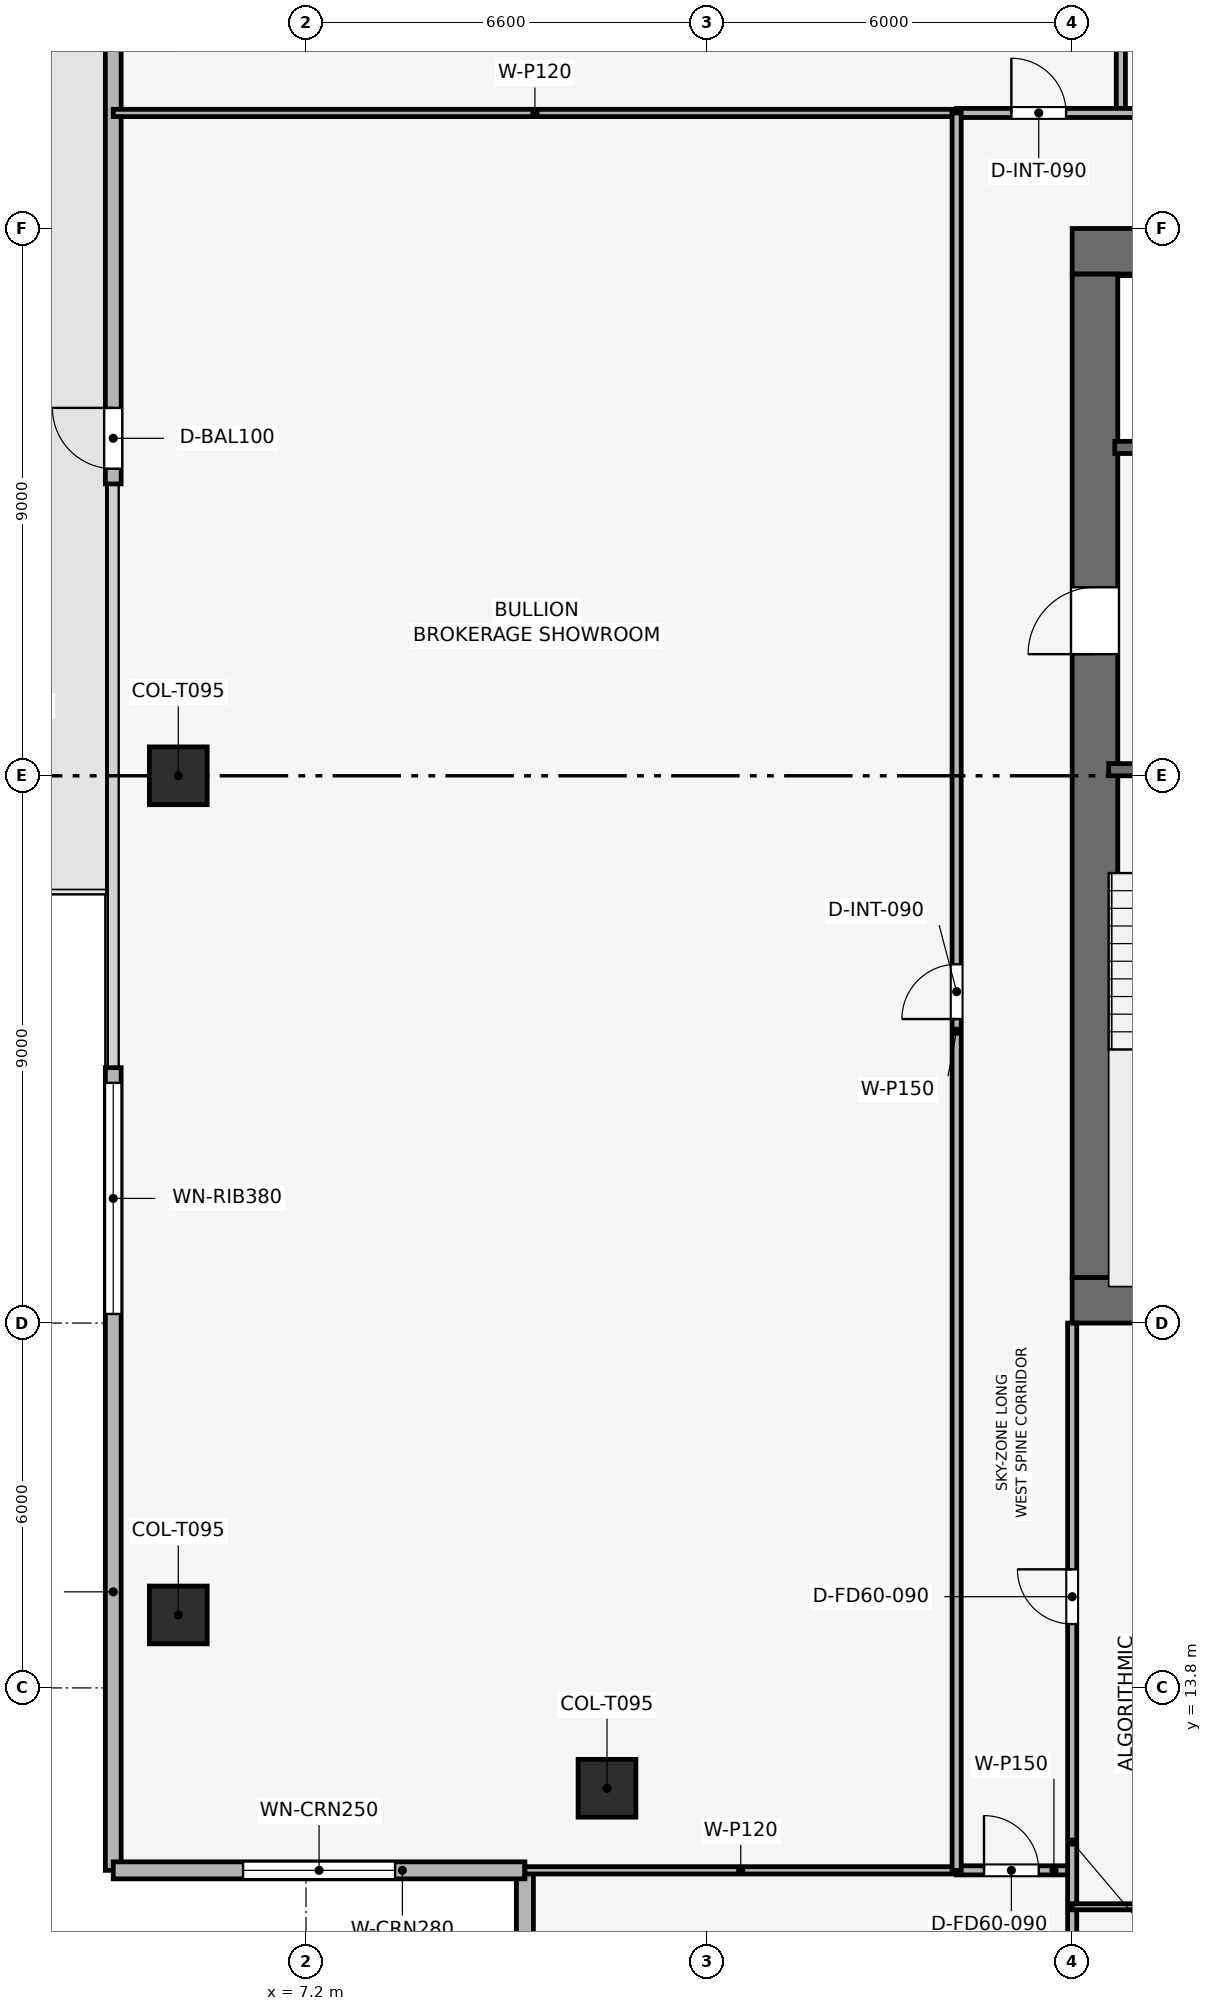
"""IFC4 building model, lengths in metres.
Left out: names, types, materials, properties, quantities, classifications, styles, units other than length and angle.
Written with IfcOpenShell. Run it as: python <this file> out.ifc"""

import sys

from ifc_helpers import new_model, si_unit, direction, frame, frame_2d, origin, origin_2d, place, context, subcontext, project, spatial, rectangle, extrude, element, fill, save


model = new_model("IFC4")
c1 = context("Model", 3, precision=1e-05, world=origin(), true_north=direction((0.0, 1.0)))
c2 = subcontext(c1, "Body", "Model", "MODEL_VIEW")
j1 = project(units=[si_unit("LENGTHUNIT", "METRE"), si_unit("PLANEANGLEUNIT", "RADIAN")], contexts=[c1])
p1 = place(None, origin())
s1 = spatial("IfcSite", under=j1, at=p1, CompositionType="ELEMENT")
p2 = place(p1, origin())
s2 = spatial("IfcBuilding", under=s1, at=p2, CompositionType="ELEMENT")
p3 = place(p2, frame((0.0, 0.0, 265.35)))
s3 = spatial("IfcBuildingStorey", under=s2, at=p3, CompositionType="ELEMENT", Elevation=265.35)
p4 = place(p3, frame((19.8, 20.175, 0.0), z_axis=(0.0, 0.0, 1.0), x_axis=(1.0, 0.0, 0.0)))
e1 = element("IfcWall", 1, at=p4, inside=s3, PredefinedType="SHEAR", context=c2, shape_type="SweptSolid", body=[
    extrude(rectangle(XDim=18.0, YDim=0.75, at=frame_2d((9.0, 0.0))), origin(), (0.0, 0.0, 1.0), 3.75),
])
p5 = place(p3, frame((19.8, 37.425, 0.0), z_axis=(0.0, 0.0, 1.0), x_axis=(1.0, 0.0, 0.0)))
e2 = element("IfcWall", 2, at=p5, inside=s3, PredefinedType="SHEAR", context=c2, shape_type="SweptSolid", body=[
    extrude(rectangle(XDim=18.0, YDim=0.75, at=frame_2d((9.0, 0.0))), origin(), (0.0, 0.0, 1.0), 3.75),
])
p6 = place(p5, frame((7.05, 0.0, 0.0)))
e3 = element("IfcOpeningElement", 3, at=p6, cuts=e2, PredefinedType="OPENING", context=c2, shape_type="SweptSolid", body=[
    extrude(rectangle(XDim=1.1, YDim=2.15, at=frame_2d((0.55, 1.075))), frame((0.0, 0.385, 0.0), z_axis=(0.0, -1.0, 0.0), x_axis=(1.0, 0.0, 0.0)), (0.0, 0.0, 1.0), 0.77),
])
p7 = place(p3, frame((20.175, 20.55, 0.0), z_axis=(0.0, 0.0, 1.0), x_axis=(0.0, 1.0, 0.0)))
e4 = element("IfcWall", 4, at=p7, inside=s3, PredefinedType="SHEAR", context=c2, shape_type="SweptSolid", body=[
    extrude(rectangle(XDim=16.5, YDim=0.75, at=frame_2d((8.25, 0.0))), origin(), (0.0, 0.0, 1.0), 3.75),
])
p8 = place(p7, frame((10.25, 0.0, 0.0)))
e5 = element("IfcOpeningElement", 5, at=p8, cuts=e4, PredefinedType="OPENING", context=c2, shape_type="SweptSolid", body=[
    extrude(rectangle(XDim=1.1, YDim=2.15, at=frame_2d((0.55, 1.075))), frame((0.0, 0.385, 0.0), z_axis=(0.0, -1.0, 0.0), x_axis=(1.0, 0.0, 0.0)), (0.0, 0.0, 1.0), 0.77),
])
for number, where, z_axis, x_axis in (
    (6, (5.1, 28.8, 0.003), (0.0, 0.0, 1.0), (1.0, 0.0, 0.0)),
    (7, (5.1, 15.0, 0.003), (0.0, 0.0, 1.0), (1.0, 0.0, 0.0)),
    (8, (12.15, 12.15, 0.003), (0.0, 0.0, 1.0), (1.0, 0.0, 0.0)),
):
    element("IfcColumn", number, at=place(p3, frame(where, z_axis=z_axis, x_axis=x_axis)), inside=s3, PredefinedType="COLUMN", context=c2, shape_type="SweptSolid", body=[
        extrude(rectangle(XDim=0.95, YDim=0.95, at=origin_2d()), origin(), (0.0, 0.0, 1.0), 3.494),
    ])
p9 = place(p3, frame((4.03, 10.8, 0.0), z_axis=(0.0, 0.0, 1.0), x_axis=(0.0, 1.0, 0.0)))
e9 = element("IfcWall", 9, at=p9, inside=s3, PredefinedType="SOLIDWALL", context=c2, shape_type="SweptSolid", body=[
    extrude(rectangle(XDim=13.2, YDim=0.26, at=frame_2d((6.6, 0.0))), origin(), (0.0, 0.0, 1.0), 3.5),
])
p10 = place(p9, frame((9.15, 0.0, 0.9)))
e10 = element("IfcOpeningElement", 10, at=p10, cuts=e9, PredefinedType="OPENING", context=c2, shape_type="SweptSolid", body=[
    extrude(rectangle(XDim=3.8, YDim=1.9, at=frame_2d((1.9, 0.95))), frame((0.0, 0.14, 0.0), z_axis=(0.0, -1.0, 0.0), x_axis=(1.0, 0.0, 0.0)), (0.0, 0.0, 1.0), 0.28),
])
p11 = place(p3, frame((4.03, 33.6, 0.0), z_axis=(0.0, 0.0, 1.0), x_axis=(0.0, 1.0, 0.0)))
e11 = element("IfcWall", 11, at=p11, inside=s3, PredefinedType="SOLIDWALL", context=c2, shape_type="SweptSolid", body=[
    extrude(rectangle(XDim=13.2, YDim=0.26, at=frame_2d((6.6, 0.0))), origin(), (0.0, 0.0, 1.0), 3.5),
])
p12 = place(p11, frame((0.25, 0.0, 0.0)))
e12 = element("IfcOpeningElement", 12, at=p12, cuts=e11, PredefinedType="OPENING", context=c2, shape_type="SweptSolid", body=[
    extrude(rectangle(XDim=1.0, YDim=2.2, at=frame_2d((0.5, 1.1))), frame((0.0, 0.14, 0.0), z_axis=(0.0, -1.0, 0.0), x_axis=(1.0, 0.0, 0.0)), (0.0, 0.0, 1.0), 0.28),
])
p13 = place(p3, frame((10.8, 4.03, 0.0), z_axis=(0.0, 0.0, 1.0), x_axis=(0.0, 1.0, 0.0)))
e13 = element("IfcWall", 13, at=p13, inside=s3, PredefinedType="SOLIDWALL", context=c2, shape_type="SweptSolid", body=[
    extrude(rectangle(XDim=6.77, YDim=0.28, at=frame_2d((3.385, 0.0))), origin(), (0.0, 0.0, 1.0), 3.5),
])
p14 = place(p13, frame((2.135, 0.0, 0.9)))
e14 = element("IfcOpeningElement", 14, at=p14, cuts=e13, PredefinedType="OPENING", context=c2, shape_type="SweptSolid", body=[
    extrude(rectangle(XDim=2.5, YDim=1.9, at=frame_2d((1.25, 0.95))), frame((0.0, 0.15, 0.0), z_axis=(0.0, -1.0, 0.0), x_axis=(1.0, 0.0, 0.0)), (0.0, 0.0, 1.0), 0.3),
])
p15 = place(p3, frame((10.8, 10.8, 0.0), z_axis=(0.0, 0.0, 1.0), x_axis=(-1.0, 0.0, 0.0)))
e15 = element("IfcWall", 15, at=p15, inside=s3, PredefinedType="SOLIDWALL", context=c2, shape_type="SweptSolid", body=[
    extrude(rectangle(XDim=6.77, YDim=0.28, at=frame_2d((3.385, 0.0))), origin(), (0.0, 0.0, 1.0), 3.5),
])
p16 = place(p15, frame((2.135, 0.0, 0.9)))
e16 = element("IfcOpeningElement", 16, at=p16, cuts=e15, PredefinedType="OPENING", context=c2, shape_type="SweptSolid", body=[
    extrude(rectangle(XDim=2.5, YDim=1.9, at=frame_2d((1.25, 0.95))), frame((0.0, 0.15, 0.0), z_axis=(0.0, -1.0, 0.0), x_axis=(1.0, 0.0, 0.0)), (0.0, 0.0, 1.0), 0.3),
])
p17 = place(p3, frame((20.4, 28.9, 0.0), z_axis=(0.0, 0.0, 1.0), x_axis=(1.0, 0.0, 0.0)))
e17 = element("IfcWall", 17, at=p17, inside=s3, PredefinedType="SHEAR", context=c2, shape_type="SweptSolid", body=[
    extrude(rectangle(XDim=3.15, YDim=0.2, at=frame_2d((1.575, 0.0))), origin(), (0.0, 0.0, 1.0), 3.5),
])
p18 = place(p17, frame((0.8, 0.0, 0.0)))
e18 = element("IfcOpeningElement", 18, at=p18, cuts=e17, PredefinedType="OPENING", context=c2, shape_type="SweptSolid", body=[
    extrude(rectangle(XDim=1.0, YDim=2.1, at=frame_2d((0.5, 1.05))), frame((0.0, 0.11, 0.0), z_axis=(0.0, -1.0, 0.0), x_axis=(1.0, 0.0, 0.0)), (0.0, 0.0, 1.0), 0.22),
])
p19 = place(p3, frame((20.5, 34.2, 0.0), z_axis=(0.0, 0.0, 1.0), x_axis=(1.0, 0.0, 0.0)))
e19 = element("IfcWall", 19, at=p19, inside=s3, PredefinedType="SHEAR", context=c2, shape_type="SweptSolid", body=[
    extrude(rectangle(XDim=3.05, YDim=0.2, at=frame_2d((1.525, 0.0))), origin(), (0.0, 0.0, 1.0), 3.5),
])
p20 = place(p19, frame((0.75, 0.0, 0.0)))
e20 = element("IfcOpeningElement", 20, at=p20, cuts=e19, PredefinedType="OPENING", context=c2, shape_type="SweptSolid", body=[
    extrude(rectangle(XDim=1.1, YDim=2.15, at=frame_2d((0.55, 1.075))), frame((0.0, 0.11, 0.0), z_axis=(0.0, -1.0, 0.0), x_axis=(1.0, 0.0, 0.0)), (0.0, 0.0, 1.0), 0.22),
])
p21 = place(p3, frame((20.6, 39.7, 0.0), z_axis=(0.0, 0.0, 1.0), x_axis=(0.0, 1.0, 0.0)))
e21 = element("IfcWall", 21, at=p21, inside=s3, PredefinedType="PARTITIONING", context=c2, shape_type="SweptSolid", body=[
    extrude(rectangle(XDim=13.87, YDim=0.15, at=frame_2d((6.935, 0.0))), origin(), (0.0, 0.0, 1.0), 3.085),
])
p22 = place(p21, frame((8.035, 0.0, 0.0)))
e22 = element("IfcOpeningElement", 22, at=p22, cuts=e21, PredefinedType="OPENING", context=c2, shape_type="SweptSolid", body=[
    extrude(rectangle(XDim=0.9, YDim=2.1, at=frame_2d((0.45, 1.05))), frame((0.0, 0.085, 0.0), z_axis=(0.0, -1.0, 0.0), x_axis=(1.0, 0.0, 0.0)), (0.0, 0.0, 1.0), 0.17),
])
p23 = place(p3, frame((10.8, 10.8, 0.0), z_axis=(0.0, 0.0, 1.0), x_axis=(1.0, 0.0, 0.0)))
e23 = element("IfcWall", 23, at=p23, inside=s3, PredefinedType="PARTITIONING", context=c2, shape_type="SweptSolid", body=[
    extrude(rectangle(XDim=7.1, YDim=0.12, at=frame_2d((3.55, 0.0))), origin(), (0.0, 0.0, 1.0), 3.085),
])
p24 = place(p3, frame((17.9, 10.8, 0.0), z_axis=(0.0, 0.0, 1.0), x_axis=(1.0, 0.0, 0.0)))
e24 = element("IfcWall", 24, at=p24, inside=s3, PredefinedType="PARTITIONING", context=c2, shape_type="SweptSolid", body=[
    extrude(rectangle(XDim=1.9, YDim=0.15, at=frame_2d((0.95, 0.0))), origin(), (0.0, 0.0, 1.0), 3.5),
])
p25 = place(p24, frame((0.45, 0.0, 0.0)))
e25 = element("IfcOpeningElement", 25, at=p25, cuts=e24, PredefinedType="OPENING", context=c2, shape_type="SweptSolid", body=[
    extrude(rectangle(XDim=0.9, YDim=2.1, at=frame_2d((0.45, 1.05))), frame((0.0, 0.085, 0.0), z_axis=(0.0, -1.0, 0.0), x_axis=(1.0, 0.0, 0.0)), (0.0, 0.0, 1.0), 0.17),
])
p26 = place(p3, frame((19.8, 4.03, 0.0), z_axis=(0.0, 0.0, 1.0), x_axis=(0.0, 1.0, 0.0)))
e26 = element("IfcWall", 26, at=p26, inside=s3, PredefinedType="PARTITIONING", context=c2, shape_type="SweptSolid", body=[
    extrude(rectangle(XDim=15.77, YDim=0.15, at=frame_2d((7.885, 0.0))), origin(), (0.0, 0.0, 1.0), 3.085),
])
p27 = place(p26, frame((10.82, 0.0, 0.0)))
e27 = element("IfcOpeningElement", 27, at=p27, cuts=e26, PredefinedType="OPENING", context=c2, shape_type="SweptSolid", body=[
    extrude(rectangle(XDim=0.9, YDim=2.1, at=frame_2d((0.45, 1.05))), frame((0.0, 0.085, 0.0), z_axis=(0.0, -1.0, 0.0), x_axis=(1.0, 0.0, 0.0)), (0.0, 0.0, 1.0), 0.17),
])
p28 = place(p3, frame((19.8, 10.201, 0.0), z_axis=(0.0, 0.0, 1.0), x_axis=(1.0, 0.0, 0.0)))
e28 = element("IfcWall", 28, at=p28, inside=s3, PredefinedType="MOVABLE", context=c2, shape_type="SweptSolid", body=[
    extrude(rectangle(XDim=2.3, YDim=0.1, at=frame_2d((1.15, 0.0))), origin(), (0.0, 0.0, 1.0), 3.085),
])
p29 = place(p28, frame((1.2, 0.0, 0.0)))
e29 = element("IfcOpeningElement", 29, at=p29, cuts=e28, PredefinedType="OPENING", context=c2, shape_type="SweptSolid", body=[
    extrude(rectangle(XDim=0.9, YDim=2.1, at=frame_2d((0.45, 1.05))), frame((0.0, 0.06, 0.0), z_axis=(0.0, -1.0, 0.0), x_axis=(1.0, 0.0, 0.0)), (0.0, 0.0, 1.0), 0.12),
])
p30 = place(p3, frame((4.03, 39.7, 0.0), z_axis=(0.0, 0.0, 1.0), x_axis=(1.0, 0.0, 0.0)))
e30 = element("IfcWall", 30, at=p30, inside=s3, PredefinedType="PARTITIONING", context=c2, shape_type="SweptSolid", body=[
    extrude(rectangle(XDim=13.87, YDim=0.12, at=frame_2d((6.935, 0.0))), origin(), (0.0, 0.0, 1.0), 3.085),
])
p31 = place(p3, frame((17.9, 39.7, 0.0), z_axis=(0.0, 0.0, 1.0), x_axis=(1.0, 0.0, 0.0)))
e31 = element("IfcWall", 31, at=p31, inside=s3, PredefinedType="PARTITIONING", context=c2, shape_type="SweptSolid", body=[
    extrude(rectangle(XDim=21.8, YDim=0.15, at=frame_2d((10.9, 0.0))), origin(), (0.0, 0.0, 1.0), 3.085),
])
p32 = place(p31, frame((0.9, 0.0, 0.0)))
e32 = element("IfcOpeningElement", 32, at=p32, cuts=e31, PredefinedType="OPENING", context=c2, shape_type="SweptSolid", body=[
    extrude(rectangle(XDim=0.9, YDim=2.1, at=frame_2d((0.45, 1.05))), frame((0.0, 0.085, 0.0), z_axis=(0.0, -1.0, 0.0), x_axis=(1.0, 0.0, 0.0)), (0.0, 0.0, 1.0), 0.17),
])
p33 = place(p31, frame((3.65, 0.0, 0.0)))
e33 = element("IfcOpeningElement", 33, at=p33, cuts=e31, PredefinedType="OPENING", context=c2, shape_type="SweptSolid", body=[
    extrude(rectangle(XDim=0.9, YDim=2.1, at=frame_2d((0.45, 1.05))), frame((0.0, 0.085, 0.0), z_axis=(0.0, -1.0, 0.0), x_axis=(1.0, 0.0, 0.0)), (0.0, 0.0, 1.0), 0.17),
])
p34 = place(p31, frame((6.55, 0.0, 0.0)))
e34 = element("IfcOpeningElement", 34, at=p34, cuts=e31, PredefinedType="OPENING", context=c2, shape_type="SweptSolid", body=[
    extrude(rectangle(XDim=0.9, YDim=2.1, at=frame_2d((0.45, 1.05))), frame((0.0, 0.085, 0.0), z_axis=(0.0, -1.0, 0.0), x_axis=(1.0, 0.0, 0.0)), (0.0, 0.0, 1.0), 0.17),
])
p35 = place(p31, frame((9.3, 0.0, 0.0)))
e35 = element("IfcOpeningElement", 35, at=p35, cuts=e31, PredefinedType="OPENING", context=c2, shape_type="SweptSolid", body=[
    extrude(rectangle(XDim=0.95, YDim=2.1, at=frame_2d((0.475, 1.05))), frame((0.0, 0.085, 0.0), z_axis=(0.0, -1.0, 0.0), x_axis=(1.0, 0.0, 0.0)), (0.0, 0.0, 1.0), 0.17),
])
p36 = place(p31, frame((16.0, 0.0, 0.0)))
e36 = element("IfcOpeningElement", 36, at=p36, cuts=e31, PredefinedType="OPENING", context=c2, shape_type="SweptSolid", body=[
    extrude(rectangle(XDim=0.9, YDim=2.1, at=frame_2d((0.45, 1.05))), frame((0.0, 0.085, 0.0), z_axis=(0.0, -1.0, 0.0), x_axis=(1.0, 0.0, 0.0)), (0.0, 0.0, 1.0), 0.17),
])
p37 = place(p3, frame((17.9, 10.8, 0.0), z_axis=(0.0, 0.0, 1.0), x_axis=(0.0, 1.0, 0.0)))
e37 = element("IfcWall", 37, at=p37, inside=s3, PredefinedType="PARTITIONING", context=c2, shape_type="SweptSolid", body=[
    extrude(rectangle(XDim=28.9, YDim=0.15, at=frame_2d((14.45, 0.0))), origin(), (0.0, 0.0, 1.0), 3.085),
])
p38 = place(p37, frame((14.0, 0.0, 0.0)))
e38 = element("IfcOpeningElement", 38, at=p38, cuts=e37, PredefinedType="OPENING", context=c2, shape_type="SweptSolid", body=[
    extrude(rectangle(XDim=0.9, YDim=2.1, at=frame_2d((0.45, 1.05))), frame((0.0, 0.085, 0.0), z_axis=(0.0, -1.0, 0.0), x_axis=(1.0, 0.0, 0.0)), (0.0, 0.0, 1.0), 0.17),
])
p39 = place(p12, origin())
e39 = element("IfcDoor", 39, at=p39, inside=s3, OperationType="SINGLE_SWING_RIGHT", PredefinedType="DOOR", context=c2, shape_type="SweptSolid", body=[
    extrude(rectangle(XDim=1.0, YDim=2.2, at=frame_2d((0.5, 1.1))), frame((0.0, 0.025, 0.0), z_axis=(0.0, -1.0, 0.0), x_axis=(1.0, 0.0, 0.0)), (0.0, 0.0, 1.0), 0.05),
])
fill(e12, e39)
p40 = place(p10, origin())
e40 = element("IfcWindow", 40, at=p40, inside=s3, PartitioningType="SINGLE_PANEL", PredefinedType="WINDOW", context=c2, shape_type="SweptSolid", body=[
    extrude(rectangle(XDim=3.8, YDim=1.9, at=frame_2d((1.9, 0.95))), frame((0.0, 0.03, 0.0), z_axis=(0.0, -1.0, 0.0), x_axis=(1.0, 0.0, 0.0)), (0.0, 0.0, 1.0), 0.06),
])
fill(e10, e40)
p41 = place(p16, origin())
e41 = element("IfcWindow", 41, at=p41, inside=s3, PartitioningType="SINGLE_PANEL", PredefinedType="WINDOW", context=c2, shape_type="SweptSolid", body=[
    extrude(rectangle(XDim=2.5, YDim=1.9, at=frame_2d((1.25, 0.95))), frame((0.0, 0.03, 0.0), z_axis=(0.0, -1.0, 0.0), x_axis=(1.0, 0.0, 0.0)), (0.0, 0.0, 1.0), 0.06),
])
fill(e16, e41)
p42 = place(p25, origin())
e42 = element("IfcDoor", 42, at=p42, inside=s3, OperationType="SINGLE_SWING_LEFT", PredefinedType="DOOR", context=c2, shape_type="SweptSolid", body=[
    extrude(rectangle(XDim=0.9, YDim=2.1, at=frame_2d((0.45, 1.05))), frame((0.0, 0.025, 0.0), z_axis=(0.0, -1.0, 0.0), x_axis=(1.0, 0.0, 0.0)), (0.0, 0.0, 1.0), 0.05),
])
fill(e25, e42)
p43 = place(p27, origin())
e43 = element("IfcDoor", 43, at=p43, inside=s3, OperationType="SINGLE_SWING_RIGHT", PredefinedType="DOOR", context=c2, shape_type="SweptSolid", body=[
    extrude(rectangle(XDim=0.9, YDim=2.1, at=frame_2d((0.45, 1.05))), frame((0.0, 0.025, 0.0), z_axis=(0.0, -1.0, 0.0), x_axis=(1.0, 0.0, 0.0)), (0.0, 0.0, 1.0), 0.05),
])
fill(e27, e43)
p44 = place(p32, origin())
e44 = element("IfcDoor", 44, at=p44, inside=s3, OperationType="SINGLE_SWING_LEFT", PredefinedType="DOOR", context=c2, shape_type="SweptSolid", body=[
    extrude(rectangle(XDim=0.9, YDim=2.1, at=frame_2d((0.45, 1.05))), frame((0.0, 0.025, 0.0), z_axis=(0.0, -1.0, 0.0), x_axis=(1.0, 0.0, 0.0)), (0.0, 0.0, 1.0), 0.05),
])
fill(e32, e44)
p45 = place(p38, origin())
e45 = element("IfcDoor", 45, at=p45, inside=s3, OperationType="SINGLE_SWING_LEFT", PredefinedType="DOOR", context=c2, shape_type="SweptSolid", body=[
    extrude(rectangle(XDim=0.9, YDim=2.1, at=frame_2d((0.45, 1.05))), frame((0.0, 0.025, 0.0), z_axis=(0.0, -1.0, 0.0), x_axis=(1.0, 0.0, 0.0)), (0.0, 0.0, 1.0), 0.05),
])
fill(e38, e45)
p46 = place(p8, origin())
e46 = element("IfcDoor", 46, at=p46, inside=s3, OperationType="SINGLE_SWING_LEFT", PredefinedType="DOOR", context=c2, shape_type="SweptSolid", body=[
    extrude(rectangle(XDim=1.1, YDim=2.15, at=frame_2d((0.55, 1.075))), frame((0.0, 0.025, 0.0), z_axis=(0.0, -1.0, 0.0), x_axis=(1.0, 0.0, 0.0)), (0.0, 0.0, 1.0), 0.05),
])
fill(e5, e46)
save(model, sys.argv[1])
